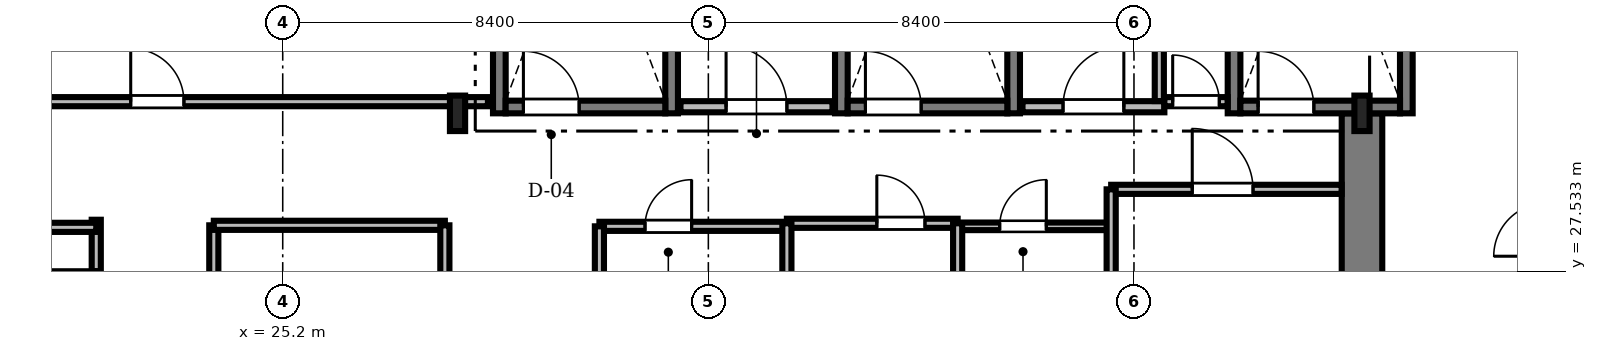
"""IFC4 building model, lengths in metres.
Left out: names, types, materials, properties, quantities, classifications, styles, units other than length and angle.
Written with IfcOpenShell. Run it as: python <this file> out.ifc"""

import sys

from ifc_helpers import new_model, si_unit, direction, frame, frame_2d, origin, origin_2d, place, context, subcontext, project, spatial, rectangle, i_section, extrude, source, transform, mapped, element, fill, save


model = new_model("IFC4")
c1 = context("Model", 3, precision=1e-05, world=origin(), true_north=direction((0.0, 1.0)))
c2 = subcontext(c1, "Body", "Model", "MODEL_VIEW")
j1 = project(units=[si_unit("LENGTHUNIT", "METRE"), si_unit("PLANEANGLEUNIT", "RADIAN")], contexts=[c1])
p1 = place(None, origin())
s1 = spatial("IfcSite", under=j1, at=p1, CompositionType="ELEMENT")
p2 = place(p1, origin())
s2 = spatial("IfcBuilding", under=s1, at=p2, CompositionType="ELEMENT")
p3 = place(p2, frame((0.0, 0.0, 207.3)))
s3 = spatial("IfcBuildingStorey", under=s2, at=p3, CompositionType="ELEMENT", Elevation=207.3)
m1 = source(origin(), c2, "Body", "SweptSolid", [
    extrude(rectangle(XDim=13.15, YDim=0.8, at=frame_2d((6.575, 0.0))), origin(), (0.0, 0.0, 1.0), 3.53),
])
p4 = place(p3, frame((46.5, 17.5, 0.0), z_axis=(0.0, 0.0, 1.0), x_axis=(0.0, 1.0, 0.0)))
e1 = element("IfcWall", 1, at=p4, inside=s3, PredefinedType="SHEAR", context=c2, shape_type="MappedRepresentation", body=[
    mapped(m1, transform((0.0, 0.0, 0.0), scale=1.0)),
])
m2 = source(origin(), c2, "Body", "SweptSolid", [
    extrude(i_section(OverallWidth=0.3, OverallDepth=0.7, WebThickness=0.017, FlangeThickness=0.032, FilletRadius=0.027, at=origin_2d()), origin(), (0.0, 0.0, 1.0), 3.53),
])
for number, where, z_axis, x_axis in (
    (2, (28.65, 30.65, 0.0), (0.0, 0.0, 1.0), (1.0, 0.0, 0.0)),
    (3, (46.5, 30.65, 0.0), (0.0, 0.0, 1.0), (1.0, 0.0, 0.0)),
):
    element("IfcColumn", number, at=place(p3, frame(where, z_axis=z_axis, x_axis=x_axis)), inside=s3, PredefinedType="COLUMN", context=c2, shape_type="MappedRepresentation", body=[
        mapped(m2, transform((0.0, 0.0, 0.0), scale=1.0)),
    ])
m3 = source(origin(), c2, "Body", "SweptSolid", [
    extrude(rectangle(XDim=9.25, YDim=0.25, at=frame_2d((4.625, 0.0))), origin(), (0.0, 0.0, 1.0), 3.55),
])
for number, where, z_axis, x_axis in (
    (4, (29.475, 30.65, 0.0), (0.0, 0.0, 1.0), (0.0, 1.0, 0.0)),
    (5, (32.875, 30.65, 0.0), (0.0, 0.0, 1.0), (0.0, 1.0, 0.0)),
):
    element("IfcWall", number, at=place(p3, frame(where, z_axis=z_axis, x_axis=x_axis)), inside=s3, PredefinedType="SOLIDWALL", context=c2, shape_type="MappedRepresentation", body=[
        mapped(m3, transform((0.0, 0.0, 0.0), scale=1.0)),
    ])
m4 = source(origin(), c2, "Body", "SweptSolid", [
    extrude(rectangle(XDim=3.15, YDim=0.25, at=frame_2d((1.575, 0.0))), origin(), (0.0, 0.0, 1.0), 3.55),
])
p5 = place(p3, frame((29.6, 30.775, 0.0), z_axis=(0.0, 0.0, 1.0), x_axis=(1.0, 0.0, 0.0)))
e6 = element("IfcWall", 6, at=p5, inside=s3, PredefinedType="SOLIDWALL", context=c2, shape_type="MappedRepresentation", body=[
    mapped(m4, transform((0.0, 0.0, 0.0), scale=1.0)),
])
m5 = source(origin(), c2, "Body", "SweptSolid", [
    extrude(rectangle(XDim=1.1, YDim=2.2, at=frame_2d((0.55, 1.1))), frame((0.0, 0.135, 0.0), z_axis=(0.0, -1.0, 0.0), x_axis=(1.0, 0.0, 0.0)), (0.0, 0.0, 1.0), 0.27),
])
p6 = place(p5, frame((0.35, 0.0, 0.0)))
e7 = element("IfcOpeningElement", 7, at=p6, cuts=e6, PredefinedType="OPENING", context=c2, shape_type="MappedRepresentation", body=[
    mapped(m5, transform((0.0, 0.0, 0.0), scale=1.0)),
])
for number, where, z_axis, x_axis in (
    (8, (36.225, 30.65, 0.0), (0.0, 0.0, 1.0), (0.0, 1.0, 0.0)),
    (9, (39.625, 30.65, 0.0), (0.0, 0.0, 1.0), (0.0, 1.0, 0.0)),
):
    element("IfcWall", number, at=place(p3, frame(where, z_axis=z_axis, x_axis=x_axis)), inside=s3, PredefinedType="SOLIDWALL", context=c2, shape_type="MappedRepresentation", body=[
        mapped(m3, transform((0.0, 0.0, 0.0), scale=1.0)),
    ])
p7 = place(p3, frame((36.35, 30.775, 0.0), z_axis=(0.0, 0.0, 1.0), x_axis=(1.0, 0.0, 0.0)))
e10 = element("IfcWall", 10, at=p7, inside=s3, PredefinedType="SOLIDWALL", context=c2, shape_type="MappedRepresentation", body=[
    mapped(m4, transform((0.0, 0.0, 0.0), scale=1.0)),
])
p8 = place(p7, frame((0.35, 0.0, 0.0)))
e11 = element("IfcOpeningElement", 11, at=p8, cuts=e10, PredefinedType="OPENING", context=c2, shape_type="MappedRepresentation", body=[
    mapped(m5, transform((0.0, 0.0, 0.0), scale=1.0)),
])
for number, where, z_axis, x_axis in (
    (12, (43.975, 30.65, 0.0), (0.0, 0.0, 1.0), (0.0, 1.0, 0.0)),
    (13, (47.375, 30.65, 0.0), (0.0, 0.0, 1.0), (0.0, 1.0, 0.0)),
):
    element("IfcWall", number, at=place(p3, frame(where, z_axis=z_axis, x_axis=x_axis)), inside=s3, PredefinedType="SOLIDWALL", context=c2, shape_type="MappedRepresentation", body=[
        mapped(m3, transform((0.0, 0.0, 0.0), scale=1.0)),
    ])
p9 = place(p3, frame((44.1, 30.775, 0.0), z_axis=(0.0, 0.0, 1.0), x_axis=(1.0, 0.0, 0.0)))
e14 = element("IfcWall", 14, at=p9, inside=s3, PredefinedType="SOLIDWALL", context=c2, shape_type="MappedRepresentation", body=[
    mapped(m4, transform((0.0, 0.0, 0.0), scale=1.0)),
])
p10 = place(p9, frame((0.35, 0.0, 0.0)))
e15 = element("IfcOpeningElement", 15, at=p10, cuts=e14, PredefinedType="OPENING", context=c2, shape_type="MappedRepresentation", body=[
    mapped(m5, transform((0.0, 0.0, 0.0), scale=1.0)),
])
m6 = source(origin(), c2, "Body", "SweptSolid", [
    extrude(rectangle(XDim=3.0, YDim=0.22, at=frame_2d((1.5, 0.0))), origin(), (0.0, 0.0, 1.0), 3.53),
])
p11 = place(p3, frame((33.05, 30.78, 0.0), z_axis=(0.0, 0.0, 1.0), x_axis=(1.0, 0.0, 0.0)))
e16 = element("IfcWall", 16, at=p11, inside=s3, PredefinedType="SOLIDWALL", context=c2, shape_type="MappedRepresentation", body=[
    mapped(m6, transform((0.0, 0.0, 0.0), scale=1.0)),
])
m7 = source(origin(), c2, "Body", "SweptSolid", [
    extrude(rectangle(XDim=1.2, YDim=2.2, at=frame_2d((0.6, 1.1))), frame((0.0, 0.12, 0.0), z_axis=(0.0, -1.0, 0.0), x_axis=(1.0, 0.0, 0.0)), (0.0, 0.0, 1.0), 0.24),
])
p12 = place(p11, frame((0.9, 0.0, 0.0)))
e17 = element("IfcOpeningElement", 17, at=p12, cuts=e16, PredefinedType="OPENING", context=c2, shape_type="MappedRepresentation", body=[
    mapped(m7, transform((0.0, 0.0, 0.0), scale=1.0)),
])
m8 = source(origin(), c2, "Body", "SweptSolid", [
    extrude(rectangle(XDim=2.8, YDim=0.22, at=frame_2d((1.4, 0.0))), origin(), (0.0, 0.0, 1.0), 3.53),
])
p13 = place(p3, frame((39.8, 30.78, 0.0), z_axis=(0.0, 0.0, 1.0), x_axis=(1.0, 0.0, 0.0)))
e18 = element("IfcWall", 18, at=p13, inside=s3, PredefinedType="SOLIDWALL", context=c2, shape_type="MappedRepresentation", body=[
    mapped(m8, transform((0.0, 0.0, 0.0), scale=1.0)),
])
p14 = place(p13, frame((0.8, 0.0, 0.0)))
e19 = element("IfcOpeningElement", 19, at=p14, cuts=e18, PredefinedType="OPENING", context=c2, shape_type="MappedRepresentation", body=[
    mapped(m7, transform((0.0, 0.0, 0.0), scale=1.0)),
])
m9 = source(origin(), c2, "Body", "SweptSolid", [
    extrude(rectangle(XDim=17.828, YDim=0.18, at=frame_2d((8.914, 0.0))), origin(), (0.0, 0.0, 1.0), 2.772),
])
p15 = place(p3, frame((11.422, 30.88, 0.0), z_axis=(0.0, 0.0, 1.0), x_axis=(1.0, 0.0, 0.0)))
e20 = element("IfcWall", 20, at=p15, inside=s3, PredefinedType="PARTITIONING", context=c2, shape_type="MappedRepresentation", body=[
    mapped(m9, transform((0.0, 0.0, 0.0), scale=1.0)),
])
m10 = source(origin(), c2, "Body", "SweptSolid", [
    extrude(rectangle(XDim=1.05, YDim=2.2, at=frame_2d((0.525, 1.1))), frame((0.0, 0.1, 0.0), z_axis=(0.0, -1.0, 0.0), x_axis=(1.0, 0.0, 0.0)), (0.0, 0.0, 1.0), 0.2),
])
p16 = place(p15, frame((10.778, 0.0, 0.0)))
e21 = element("IfcOpeningElement", 21, at=p16, cuts=e20, PredefinedType="OPENING", context=c2, shape_type="MappedRepresentation", body=[
    mapped(m10, transform((0.0, 0.0, 0.0), scale=1.0)),
])
m11 = source(origin(), c2, "Body", "SweptSolid", [
    extrude(rectangle(XDim=15.1, YDim=0.18, at=frame_2d((7.55, 0.0))), origin(), (0.0, 0.0, 1.0), 2.972),
])
p17 = place(p3, frame((21.52, 13.45, 0.0), z_axis=(0.0, 0.0, 1.0), x_axis=(0.0, 1.0, 0.0)))
e22 = element("IfcWall", 22, at=p17, inside=s3, PredefinedType="PARTITIONING", context=c2, shape_type="MappedRepresentation", body=[
    mapped(m11, transform((0.0, 0.0, 0.0), scale=1.0)),
])
p18 = place(p17, frame((1.972, 0.0, 0.0)))
e23 = element("IfcOpeningElement", 23, at=p18, cuts=e22, PredefinedType="OPENING", context=c2, shape_type="MappedRepresentation", body=[
    mapped(m10, transform((0.0, 0.0, 0.0), scale=1.0)),
])
m12 = source(origin(), c2, "Body", "SweptSolid", [
    extrude(rectangle(XDim=0.95, YDim=2.15, at=frame_2d((0.475, 1.075))), frame((0.0, 0.1, 0.0), z_axis=(0.0, -1.0, 0.0), x_axis=(1.0, 0.0, 0.0)), (0.0, 0.0, 1.0), 0.2),
])
p19 = place(p17, frame((8.18, 0.0, 0.0)))
e24 = element("IfcOpeningElement", 24, at=p19, cuts=e22, PredefinedType="OPENING", context=c2, shape_type="MappedRepresentation", body=[
    mapped(m12, transform((0.0, 0.0, 0.0), scale=1.0)),
])
p20 = place(p17, frame((13.163, 0.0, 0.0)))
e25 = element("IfcOpeningElement", 25, at=p20, cuts=e22, PredefinedType="OPENING", context=c2, shape_type="MappedRepresentation", body=[
    mapped(m12, transform((0.0, 0.0, 0.0), scale=1.0)),
])
m13 = source(origin(), c2, "Body", "SweptSolid", [
    extrude(rectangle(XDim=4.548, YDim=0.18, at=frame_2d((2.274, 0.0))), origin(), (0.0, 0.0, 1.0), 3.162),
])
p21 = place(p3, frame((41.55, 29.15, 0.0), z_axis=(0.0, 0.0, 1.0), x_axis=(1.0, 0.0, 0.0)))
e26 = element("IfcWall", 26, at=p21, inside=s3, PredefinedType="PARTITIONING", context=c2, shape_type="MappedRepresentation", body=[
    mapped(m13, transform((0.0, 0.0, 0.0), scale=1.0)),
])
m14 = source(origin(), c2, "Body", "SweptSolid", [
    extrude(rectangle(XDim=1.2, YDim=2.2, at=frame_2d((0.6, 1.1))), frame((0.0, 0.1, 0.0), z_axis=(0.0, -1.0, 0.0), x_axis=(1.0, 0.0, 0.0)), (0.0, 0.0, 1.0), 0.2),
])
p22 = place(p21, frame((1.6, 0.0, 0.0)))
e27 = element("IfcOpeningElement", 27, at=p22, cuts=e26, PredefinedType="OPENING", context=c2, shape_type="MappedRepresentation", body=[
    mapped(m14, transform((0.0, 0.0, 0.0), scale=1.0)),
])
m15 = source(origin(), c2, "Body", "SweptSolid", [
    extrude(rectangle(XDim=4.24, YDim=0.18, at=frame_2d((2.12, 0.0))), origin(), (0.0, 0.0, 1.0), 2.972),
])
p23 = place(p3, frame((23.84, 24.2, 0.0), z_axis=(0.0, 0.0, 1.0), x_axis=(0.0, 1.0, 0.0)))
e28 = element("IfcWall", 28, at=p23, inside=s3, PredefinedType="PARTITIONING", context=c2, shape_type="MappedRepresentation", body=[
    mapped(m15, transform((0.0, 0.0, 0.0), scale=1.0)),
])
p24 = place(p23, frame((1.4, 0.0, 0.0)))
e29 = element("IfcOpeningElement", 29, at=p24, cuts=e28, PredefinedType="OPENING", context=c2, shape_type="MappedRepresentation", body=[
    mapped(m10, transform((0.0, 0.0, 0.0), scale=1.0)),
])
m16 = source(origin(), c2, "Body", "SweptSolid", [
    extrude(rectangle(XDim=3.7, YDim=0.18, at=frame_2d((1.85, 0.0))), origin(), (0.0, 0.0, 1.0), 3.162),
])
p25 = place(p3, frame((31.45, 28.42, 0.0), z_axis=(0.0, 0.0, 1.0), x_axis=(1.0, 0.0, 0.0)))
e30 = element("IfcWall", 30, at=p25, inside=s3, PredefinedType="PARTITIONING", context=c2, shape_type="MappedRepresentation", body=[
    mapped(m16, transform((0.0, 0.0, 0.0), scale=1.0)),
])
m17 = source(origin(), c2, "Body", "SweptSolid", [
    extrude(rectangle(XDim=0.92, YDim=2.1, at=frame_2d((0.46, 1.05))), frame((0.0, 0.1, 0.0), z_axis=(0.0, -1.0, 0.0), x_axis=(1.0, 0.0, 0.0)), (0.0, 0.0, 1.0), 0.2),
])
p26 = place(p25, frame((0.9, 0.0, 0.0)))
e31 = element("IfcOpeningElement", 31, at=p26, cuts=e30, PredefinedType="OPENING", context=c2, shape_type="MappedRepresentation", body=[
    mapped(m17, transform((0.0, 0.0, 0.0), scale=1.0)),
])
m18 = source(origin(), c2, "Body", "SweptSolid", [
    extrude(rectangle(XDim=3.37, YDim=0.18, at=frame_2d((1.685, 0.0))), origin(), (0.0, 0.0, 1.0), 3.53),
])
p27 = place(p3, frame((35.15, 28.48, 0.0), z_axis=(0.0, 0.0, 1.0), x_axis=(1.0, 0.0, 0.0)))
e32 = element("IfcWall", 32, at=p27, inside=s3, PredefinedType="PARTITIONING", context=c2, shape_type="MappedRepresentation", body=[
    mapped(m18, transform((0.0, 0.0, 0.0), scale=1.0)),
])
p28 = place(p27, frame((1.775, 0.0, 0.0)))
e33 = element("IfcOpeningElement", 33, at=p28, cuts=e32, PredefinedType="OPENING", context=c2, shape_type="MappedRepresentation", body=[
    mapped(m12, transform((0.0, 0.0, 0.0), scale=1.0)),
])
m19 = source(origin(), c2, "Body", "SweptSolid", [
    extrude(rectangle(XDim=3.0, YDim=0.15, at=frame_2d((1.5, 0.0))), origin(), (0.0, 0.0, 1.0), 3.53),
])
p29 = place(p3, frame((38.52, 28.42, 0.0), z_axis=(0.0, 0.0, 1.0), x_axis=(1.0, 0.0, 0.0)))
e34 = element("IfcWall", 34, at=p29, inside=s3, PredefinedType="PARTITIONING", context=c2, shape_type="MappedRepresentation", body=[
    mapped(m19, transform((0.0, 0.0, 0.0), scale=1.0)),
])
m20 = source(origin(), c2, "Body", "SweptSolid", [
    extrude(rectangle(XDim=0.92, YDim=2.1, at=frame_2d((0.46, 1.05))), frame((0.0, 0.085, 0.0), z_axis=(0.0, -1.0, 0.0), x_axis=(1.0, 0.0, 0.0)), (0.0, 0.0, 1.0), 0.17),
])
p30 = place(p29, frame((0.83, 0.0, 0.0)))
e35 = element("IfcOpeningElement", 35, at=p30, cuts=e34, PredefinedType="OPENING", context=c2, shape_type="MappedRepresentation", body=[
    mapped(m20, transform((0.0, 0.0, 0.0), scale=1.0)),
])
m21 = source(origin(), c2, "Body", "SweptSolid", [
    extrude(rectangle(XDim=1.248, YDim=0.18, at=frame_2d((0.624, 0.0))), origin(), (0.0, 0.0, 1.0), 3.53),
])
p31 = place(p3, frame((42.6, 30.88, 0.0), z_axis=(0.0, 0.0, 1.0), x_axis=(1.0, 0.0, 0.0)))
e36 = element("IfcWall", 36, at=p31, inside=s3, PredefinedType="PARTITIONING", context=c2, shape_type="MappedRepresentation", body=[
    mapped(m21, transform((0.0, 0.0, 0.0), scale=1.0)),
])
p32 = place(p31, frame((0.164, 0.0, 0.0)))
e37 = element("IfcOpeningElement", 37, at=p32, cuts=e36, PredefinedType="OPENING", context=c2, shape_type="MappedRepresentation", body=[
    mapped(m17, transform((0.0, 0.0, 0.0), scale=1.0)),
])
m22 = source(origin(), c2, "Body", "SweptSolid", [
    extrude(rectangle(XDim=10.29, YDim=0.18, at=frame_2d((5.145, 0.0))), origin(), (0.0, 0.0, 1.0), 2.772),
])
p33 = place(p3, frame((11.23, 28.4, 0.0), z_axis=(0.0, 0.0, 1.0), x_axis=(1.0, 0.0, 0.0)))
e38 = element("IfcWall", 38, at=p33, inside=s3, PredefinedType="PARTITIONING", context=c2, shape_type="MappedRepresentation", body=[
    mapped(m22, transform((0.0, 0.0, 0.0), scale=1.0)),
])
m23 = source(origin(), c2, "Body", "SweptSolid", [
    extrude(rectangle(XDim=4.56, YDim=0.18, at=frame_2d((2.28, 0.0))), origin(), (0.0, 0.0, 1.0), 3.53),
])
p34 = place(p3, frame((23.84, 28.44, 0.0), z_axis=(0.0, 0.0, 1.0), x_axis=(1.0, 0.0, 0.0)))
e39 = element("IfcWall", 39, at=p34, inside=s3, PredefinedType="PARTITIONING", context=c2, shape_type="MappedRepresentation", body=[
    mapped(m23, transform((0.0, 0.0, 0.0), scale=1.0)),
])
p35 = place(p3, frame((28.4, 24.2, 0.0), z_axis=(0.0, 0.0, 1.0), x_axis=(0.0, 1.0, 0.0)))
e40 = element("IfcWall", 40, at=p35, inside=s3, PredefinedType="PARTITIONING", context=c2, shape_type="MappedRepresentation", body=[
    mapped(m15, transform((0.0, 0.0, 0.0), scale=1.0)),
])
m24 = source(origin(), c2, "Body", "SweptSolid", [
    extrude(rectangle(XDim=2.35, YDim=0.18, at=frame_2d((1.175, 0.0))), origin(), (0.0, 0.0, 1.0), 2.972),
])
p36 = place(p3, frame((41.55, 26.8, 0.0), z_axis=(0.0, 0.0, 1.0), x_axis=(0.0, 1.0, 0.0)))
e41 = element("IfcWall", 41, at=p36, inside=s3, PredefinedType="PARTITIONING", context=c2, shape_type="MappedRepresentation", body=[
    mapped(m24, transform((0.0, 0.0, 0.0), scale=1.0)),
])
m25 = source(origin(), c2, "Body", "SweptSolid", [
    extrude(rectangle(XDim=1.858, YDim=0.18, at=frame_2d((0.929, 0.0))), origin(), (0.0, 0.0, 1.0), 3.53),
])
p37 = place(p3, frame((42.5, 30.892, 0.0), z_axis=(0.0, 0.0, 1.0), x_axis=(0.0, 1.0, 0.0)))
e42 = element("IfcWall", 42, at=p37, inside=s3, PredefinedType="PARTITIONING", context=c2, shape_type="MappedRepresentation", body=[
    mapped(m25, transform((0.0, 0.0, 0.0), scale=1.0)),
])
m26 = source(origin(), c2, "Body", "SweptSolid", [
    extrude(rectangle(XDim=1.66, YDim=0.18, at=frame_2d((0.83, 0.0))), origin(), (0.0, 0.0, 1.0), 3.072),
])
for number, where, z_axis, x_axis in (
    (43, (35.15, 26.82, 0.0), (0.0, 0.0, 1.0), (0.0, 1.0, 0.0)),
    (44, (38.52, 26.82, 0.0), (0.0, 0.0, 1.0), (0.0, 1.0, 0.0)),
):
    element("IfcWall", number, at=place(p3, frame(where, z_axis=z_axis, x_axis=x_axis)), inside=s3, PredefinedType="PARTITIONING", context=c2, shape_type="MappedRepresentation", body=[
        mapped(m26, transform((0.0, 0.0, 0.0), scale=1.0)),
    ])
m27 = source(origin(), c2, "Body", "SweptSolid", [
    extrude(rectangle(XDim=1.6, YDim=0.18, at=frame_2d((0.8, 0.0))), origin(), (0.0, 0.0, 1.0), 3.072),
])
p38 = place(p3, frame((31.45, 26.82, 0.0), z_axis=(0.0, 0.0, 1.0), x_axis=(0.0, 1.0, 0.0)))
e45 = element("IfcWall", 45, at=p38, inside=s3, PredefinedType="PARTITIONING", context=c2, shape_type="MappedRepresentation", body=[
    mapped(m27, transform((0.0, 0.0, 0.0), scale=1.0)),
])
m28 = source(origin(), c2, "Body", "SweptSolid", [
    extrude(rectangle(XDim=1.1, YDim=2.2, at=frame_2d((0.55, 1.1))), frame((0.0, 0.025, 0.0), z_axis=(0.0, -1.0, 0.0), x_axis=(1.0, 0.0, 0.0)), (0.0, 0.0, 1.0), 0.05),
])
p39 = place(p6, origin())
e46 = element("IfcDoor", 46, at=p39, inside=s3, OperationType="SINGLE_SWING_LEFT", PredefinedType="DOOR", context=c2, shape_type="MappedRepresentation", body=[
    mapped(m28, transform((0.0, 0.0, 0.0), scale=1.0)),
])
fill(e7, e46)
p40 = place(p8, origin())
e47 = element("IfcDoor", 47, at=p40, inside=s3, OperationType="SINGLE_SWING_LEFT", PredefinedType="DOOR", context=c2, shape_type="MappedRepresentation", body=[
    mapped(m28, transform((0.0, 0.0, 0.0), scale=1.0)),
])
fill(e11, e47)
p41 = place(p10, origin())
e48 = element("IfcDoor", 48, at=p41, inside=s3, OperationType="SINGLE_SWING_LEFT", PredefinedType="DOOR", context=c2, shape_type="MappedRepresentation", body=[
    mapped(m28, transform((0.0, 0.0, 0.0), scale=1.0)),
])
fill(e15, e48)
m29 = source(origin(), c2, "Body", "SweptSolid", [
    extrude(rectangle(XDim=1.2, YDim=2.2, at=frame_2d((0.6, 1.1))), frame((0.0, 0.025, 0.0), z_axis=(0.0, -1.0, 0.0), x_axis=(1.0, 0.0, 0.0)), (0.0, 0.0, 1.0), 0.05),
])
p42 = place(p12, origin())
e49 = element("IfcDoor", 49, at=p42, inside=s3, OperationType="SINGLE_SWING_LEFT", PredefinedType="DOOR", context=c2, shape_type="MappedRepresentation", body=[
    mapped(m29, transform((0.0, 0.0, 0.0), scale=1.0)),
])
fill(e17, e49)
p43 = place(p14, origin())
e50 = element("IfcDoor", 50, at=p43, inside=s3, OperationType="SINGLE_SWING_RIGHT", PredefinedType="DOOR", context=c2, shape_type="MappedRepresentation", body=[
    mapped(m29, transform((0.0, 0.0, 0.0), scale=1.0)),
])
fill(e19, e50)
m30 = source(origin(), c2, "Body", "SweptSolid", [
    extrude(rectangle(XDim=1.05, YDim=2.2, at=frame_2d((0.525, 1.1))), frame((0.0, 0.025, 0.0), z_axis=(0.0, -1.0, 0.0), x_axis=(1.0, 0.0, 0.0)), (0.0, 0.0, 1.0), 0.05),
])
p44 = place(p16, origin())
e51 = element("IfcDoor", 51, at=p44, inside=s3, OperationType="SINGLE_SWING_LEFT", PredefinedType="DOOR", context=c2, shape_type="MappedRepresentation", body=[
    mapped(m30, transform((0.0, 0.0, 0.0), scale=1.0)),
])
fill(e21, e51)
m31 = source(origin(), c2, "Body", "SweptSolid", [
    extrude(rectangle(XDim=0.95, YDim=2.15, at=frame_2d((0.475, 1.075))), frame((0.0, 0.025, 0.0), z_axis=(0.0, -1.0, 0.0), x_axis=(1.0, 0.0, 0.0)), (0.0, 0.0, 1.0), 0.05),
])
p45 = place(p20, origin())
e52 = element("IfcDoor", 52, at=p45, inside=s3, OperationType="SINGLE_SWING_RIGHT", PredefinedType="DOOR", context=c2, shape_type="MappedRepresentation", body=[
    mapped(m31, transform((0.0, 0.0, 0.0), scale=1.0)),
])
fill(e25, e52)
p46 = place(p22, origin())
e53 = element("IfcDoor", 53, at=p46, inside=s3, OperationType="SINGLE_SWING_LEFT", PredefinedType="DOOR", context=c2, shape_type="MappedRepresentation", body=[
    mapped(m29, transform((0.0, 0.0, 0.0), scale=1.0)),
])
fill(e27, e53)
m32 = source(origin(), c2, "Body", "SweptSolid", [
    extrude(rectangle(XDim=0.92, YDim=2.1, at=frame_2d((0.46, 1.05))), frame((0.0, 0.025, 0.0), z_axis=(0.0, -1.0, 0.0), x_axis=(1.0, 0.0, 0.0)), (0.0, 0.0, 1.0), 0.05),
])
p47 = place(p26, origin())
e54 = element("IfcDoor", 54, at=p47, inside=s3, OperationType="SINGLE_SWING_RIGHT", PredefinedType="DOOR", context=c2, shape_type="MappedRepresentation", body=[
    mapped(m32, transform((0.0, 0.0, 0.0), scale=1.0)),
])
fill(e31, e54)
p48 = place(p28, origin())
e55 = element("IfcDoor", 55, at=p48, inside=s3, OperationType="SINGLE_SWING_LEFT", PredefinedType="DOOR", context=c2, shape_type="MappedRepresentation", body=[
    mapped(m31, transform((0.0, 0.0, 0.0), scale=1.0)),
])
fill(e33, e55)
p49 = place(p30, origin())
e56 = element("IfcDoor", 56, at=p49, inside=s3, OperationType="SINGLE_SWING_RIGHT", PredefinedType="DOOR", context=c2, shape_type="MappedRepresentation", body=[
    mapped(m32, transform((0.0, 0.0, 0.0), scale=1.0)),
])
fill(e35, e56)
p50 = place(p32, origin())
e57 = element("IfcDoor", 57, at=p50, inside=s3, OperationType="SINGLE_SWING_LEFT", PredefinedType="DOOR", context=c2, shape_type="MappedRepresentation", body=[
    mapped(m32, transform((0.0, 0.0, 0.0), scale=1.0)),
])
fill(e37, e57)
save(model, sys.argv[1])
